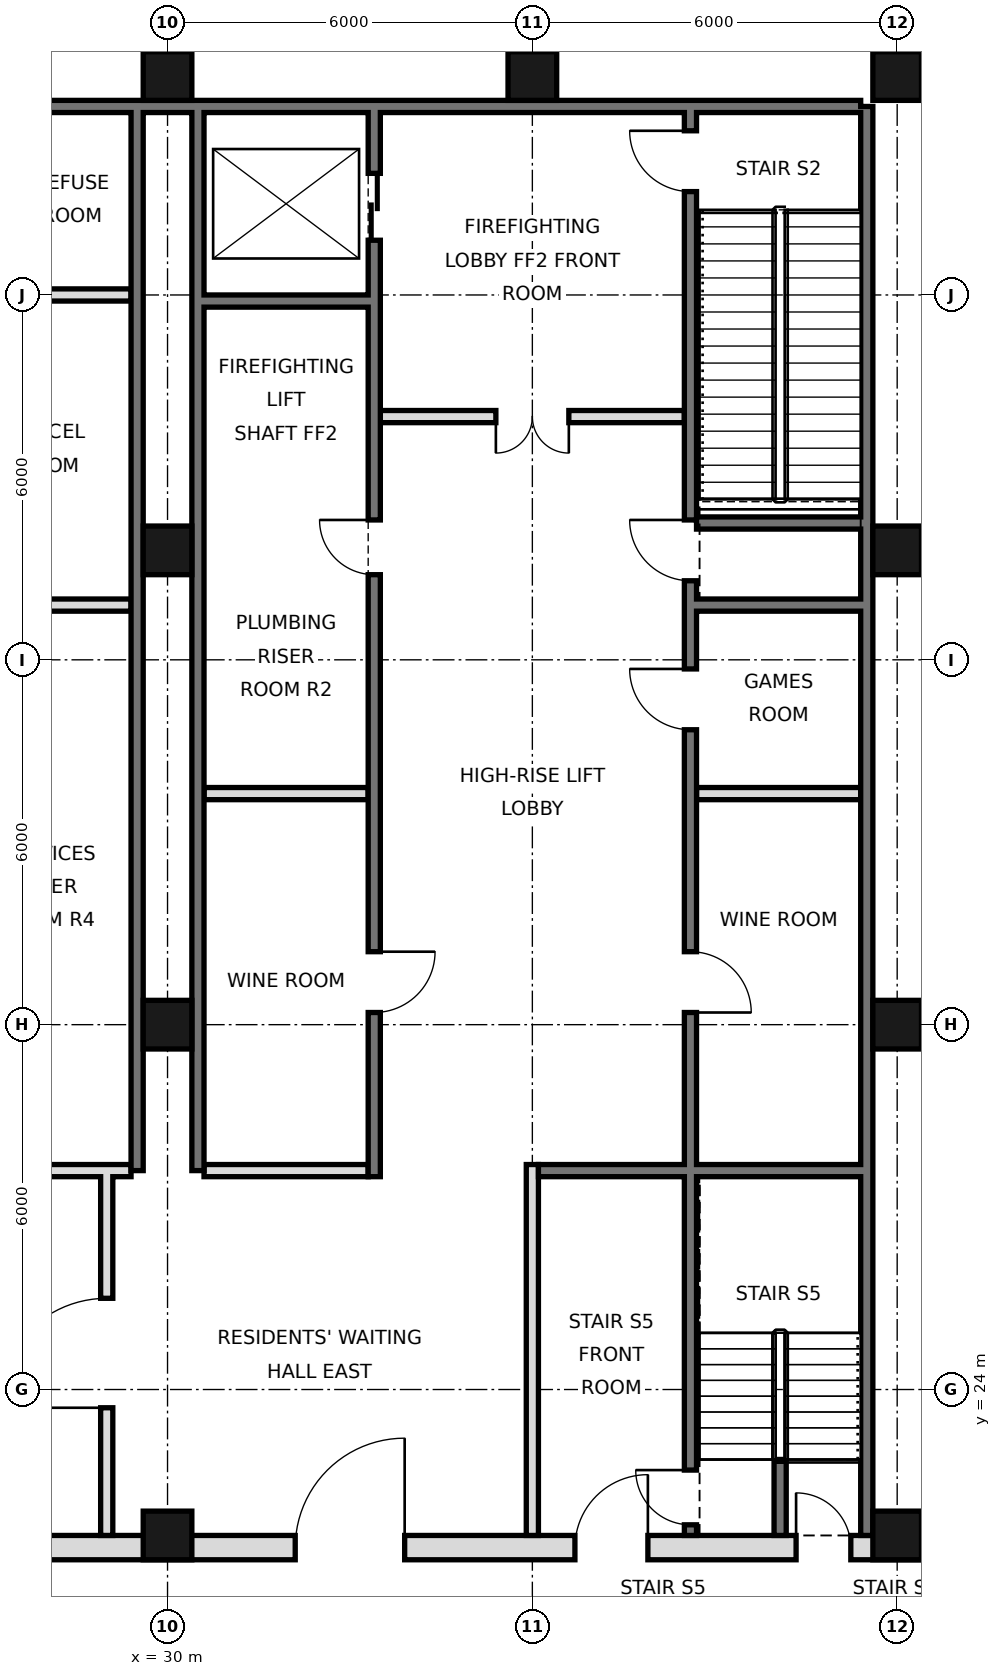
"""IFC4 building model, lengths in metres.
Left out: names, types, materials, properties, quantities, classifications, styles, units other than length and angle.
Written with IfcOpenShell. Run it as: python <this file> out.ifc"""

import sys

from ifc_helpers import new_model, si_unit, direction, frame, frame_2d, origin, origin_2d, place, context, subcontext, project, spatial, rectangle, hollow_rectangle, extrude, element, fill, save


model = new_model("IFC4")
c1 = context("Model", 3, precision=1e-05, world=origin(), true_north=direction((0.0, 1.0)))
c2 = subcontext(c1, "Body", "Model", "MODEL_VIEW")
j1 = project(units=[si_unit("LENGTHUNIT", "METRE"), si_unit("PLANEANGLEUNIT", "RADIAN")], contexts=[c1])
p1 = place(None, origin())
s1 = spatial("IfcSite", under=j1, at=p1, CompositionType="ELEMENT")
p2 = place(p1, origin())
s2 = spatial("IfcBuilding", under=s1, at=p2, CompositionType="ELEMENT")
p3 = place(p2, frame((0.0, 0.0, 90.2)))
s3 = spatial("IfcBuildingStorey", under=s2, at=p3, CompositionType="ELEMENT", Elevation=90.2)
for number, where, z_axis, x_axis in (
    (1, (30.0, 21.6, 0.0), (0.0, 0.0, 1.0), (1.0, 0.0, 0.0)),
    (2, (30.0, 30.0, 0.0), (0.0, 0.0, 1.0), (1.0, 0.0, 0.0)),
    (3, (30.0, 37.8, 0.0), (0.0, 0.0, 1.0), (1.0, 0.0, 0.0)),
    (4, (30.0, 45.6, 0.0), (0.0, 0.0, 1.0), (1.0, 0.0, 0.0)),
    (5, (36.0, 45.6, 0.0), (0.0, 0.0, 1.0), (1.0, 0.0, 0.0)),
    (6, (42.0, 21.6, 0.0), (0.0, 0.0, 1.0), (1.0, 0.0, 0.0)),
    (7, (42.0, 30.0, 0.0), (0.0, 0.0, 1.0), (1.0, 0.0, 0.0)),
    (8, (42.0, 37.8, 0.0), (0.0, 0.0, 1.0), (1.0, 0.0, 0.0)),
    (9, (42.0, 45.6, 0.0), (0.0, 0.0, 1.0), (1.0, 0.0, 0.0)),
):
    element("IfcColumn", number, at=place(p3, frame(where, z_axis=z_axis, x_axis=x_axis)), inside=s3, PredefinedType="COLUMN", context=c2, shape_type="SweptSolid", body=[
        extrude(hollow_rectangle(XDim=0.8, YDim=0.8, WallThickness=0.06, at=origin_2d()), origin(), (0.0, 0.0, 1.0), 6.0),
    ])
p4 = place(p3, frame((41.5, 21.6, 0.0), z_axis=(0.0, 0.0, 1.0), x_axis=(0.0, 1.0, 0.0)))
e10 = element("IfcWall", 10, at=p4, inside=s3, PredefinedType="SOLIDWALL", context=c2, shape_type="SweptSolid", body=[
    extrude(rectangle(XDim=23.5, YDim=0.2, at=frame_2d((11.75, 0.0))), origin(), (0.0, 0.0, 1.0), 5.7),
])
p5 = place(p3, frame((6.6, 45.1, 0.0), z_axis=(0.0, 0.0, 1.0), x_axis=(1.0, 0.0, 0.0)))
e11 = element("IfcWall", 11, at=p5, inside=s3, PredefinedType="SOLIDWALL", context=c2, shape_type="SweptSolid", body=[
    extrude(rectangle(XDim=34.8, YDim=0.2, at=frame_2d((17.4, 0.0))), origin(), (0.0, 0.0, 1.0), 5.7),
])
for number, where, z_axis, x_axis in (
    (12, (29.5, 27.6, 0.0), (0.0, 0.0, 1.0), (0.0, 1.0, 0.0)),
    (13, (30.5, 27.6, 0.0), (0.0, 0.0, 1.0), (0.0, 1.0, 0.0)),
):
    element("IfcWall", number, at=place(p3, frame(where, z_axis=z_axis, x_axis=x_axis)), inside=s3, PredefinedType="SOLIDWALL", context=c2, shape_type="SweptSolid", body=[
        extrude(rectangle(XDim=17.5, YDim=0.2, at=frame_2d((8.75, 0.0))), origin(), (0.0, 0.0, 1.0), 5.7),
    ])
p6 = place(p3, frame((5.6, 21.4, 0.0), z_axis=(0.0, 0.0, 1.0), x_axis=(1.0, 0.0, 0.0)))
e14 = element("IfcWall", 14, at=p6, inside=s3, PredefinedType="SOLIDWALL", context=c2, shape_type="SweptSolid", body=[
    extrude(rectangle(XDim=36.8, YDim=0.4, at=frame_2d((18.4, 0.0))), origin(), (0.0, 0.0, 1.0), 5.7),
])
p7 = place(p6, frame((8.5, 0.0, 0.0)))
e15 = element("IfcOpeningElement", 15, at=p7, cuts=e14, PredefinedType="OPENING", context=c2, shape_type="SweptSolid", body=[
    extrude(rectangle(XDim=1.8, YDim=2.1, at=frame_2d((0.9, 1.05))), frame((0.0, 0.21, 0.0), z_axis=(0.0, -1.0, 0.0), x_axis=(1.0, 0.0, 0.0)), (0.0, 0.0, 1.0), 0.42),
])
p8 = place(p6, frame((17.5, 0.0, 0.0)))
e16 = element("IfcOpeningElement", 16, at=p8, cuts=e14, PredefinedType="OPENING", context=c2, shape_type="SweptSolid", body=[
    extrude(rectangle(XDim=1.8, YDim=2.1, at=frame_2d((0.9, 1.05))), frame((0.0, 0.21, 0.0), z_axis=(0.0, -1.0, 0.0), x_axis=(1.0, 0.0, 0.0)), (0.0, 0.0, 1.0), 0.42),
])
p9 = place(p6, frame((26.5, 0.0, 0.0)))
e17 = element("IfcOpeningElement", 17, at=p9, cuts=e14, PredefinedType="OPENING", context=c2, shape_type="SweptSolid", body=[
    extrude(rectangle(XDim=1.8, YDim=2.1, at=frame_2d((0.9, 1.05))), frame((0.0, 0.21, 0.0), z_axis=(0.0, -1.0, 0.0), x_axis=(1.0, 0.0, 0.0)), (0.0, 0.0, 1.0), 0.42),
])
p10 = place(p6, frame((4.5, 0.0, 0.0)))
e18 = element("IfcOpeningElement", 18, at=p10, cuts=e14, PredefinedType="OPENING", context=c2, shape_type="SweptSolid", body=[
    extrude(rectangle(XDim=1.2, YDim=2.1, at=frame_2d((0.6, 1.05))), frame((0.0, 0.21, 0.0), z_axis=(0.0, -1.0, 0.0), x_axis=(1.0, 0.0, 0.0)), (0.0, 0.0, 1.0), 0.42),
])
p11 = place(p6, frame((31.1, 0.0, 0.0)))
e19 = element("IfcOpeningElement", 19, at=p11, cuts=e14, PredefinedType="OPENING", context=c2, shape_type="SweptSolid", body=[
    extrude(rectangle(XDim=1.2, YDim=2.1, at=frame_2d((0.6, 1.05))), frame((0.0, 0.21, 0.0), z_axis=(0.0, -1.0, 0.0), x_axis=(1.0, 0.0, 0.0)), (0.0, 0.0, 1.0), 0.42),
])
p12 = place(p6, frame((1.163, 0.0, 0.0)))
e20 = element("IfcOpeningElement", 20, at=p12, cuts=e14, PredefinedType="OPENING", context=c2, shape_type="SweptSolid", body=[
    extrude(rectangle(XDim=0.9, YDim=2.1, at=frame_2d((0.45, 1.05))), frame((0.0, 0.21, 0.0), z_axis=(0.0, -1.0, 0.0), x_axis=(1.0, 0.0, 0.0)), (0.0, 0.0, 1.0), 0.42),
])
p13 = place(p6, frame((34.738, 0.0, 0.0)))
e21 = element("IfcOpeningElement", 21, at=p13, cuts=e14, PredefinedType="OPENING", context=c2, shape_type="SweptSolid", body=[
    extrude(rectangle(XDim=0.9, YDim=2.1, at=frame_2d((0.45, 1.05))), frame((0.0, 0.21, 0.0), z_axis=(0.0, -1.0, 0.0), x_axis=(1.0, 0.0, 0.0)), (0.0, 0.0, 1.0), 0.42),
])
p14 = place(p3, frame((29.0, 21.6, 0.0), z_axis=(0.0, 0.0, 1.0), x_axis=(0.0, 1.0, 0.0)))
e22 = element("IfcWall", 22, at=p14, inside=s3, PredefinedType="PARTITIONING", context=c2, shape_type="SweptSolid", body=[
    extrude(rectangle(XDim=6.0, YDim=0.2, at=frame_2d((3.0, 0.0))), origin(), (0.0, 0.0, 1.0), 5.7),
])
p15 = place(p14, frame((2.1, 0.0, 0.0)))
e23 = element("IfcOpeningElement", 23, at=p15, cuts=e22, PredefinedType="OPENING", context=c2, shape_type="SweptSolid", body=[
    extrude(rectangle(XDim=1.8, YDim=2.1, at=frame_2d((0.9, 1.05))), frame((0.0, 0.11, 0.0), z_axis=(0.0, -1.0, 0.0), x_axis=(1.0, 0.0, 0.0)), (0.0, 0.0, 1.0), 0.22),
])
p16 = place(p3, frame((33.4, 27.5, 0.0), z_axis=(0.0, 0.0, 1.0), x_axis=(0.0, 1.0, 0.0)))
e24 = element("IfcWall", 24, at=p16, inside=s3, PredefinedType="SOLIDWALL", context=c2, shape_type="SweptSolid", body=[
    extrude(rectangle(XDim=17.5, YDim=0.2, at=frame_2d((8.75, 0.0))), origin(), (0.0, 0.0, 1.0), 5.7),
])
p17 = place(p16, frame((15.4, 0.0, 0.0)))
e25 = element("IfcOpeningElement", 25, at=p17, cuts=e24, PredefinedType="OPENING", context=c2, shape_type="SweptSolid", body=[
    extrude(rectangle(XDim=1.1, YDim=2.1, at=frame_2d((0.55, 1.05))), frame((0.0, 0.11, 0.0), z_axis=(0.0, -1.0, 0.0), x_axis=(1.0, 0.0, 0.0)), (0.0, 0.0, 1.0), 0.22),
])
p18 = place(p16, frame((2.7, 0.0, 0.0)))
e26 = element("IfcOpeningElement", 26, at=p18, cuts=e24, PredefinedType="OPENING", context=c2, shape_type="SweptSolid", body=[
    extrude(rectangle(XDim=1.0, YDim=2.1, at=frame_2d((0.5, 1.05))), frame((0.0, 0.11, 0.0), z_axis=(0.0, -1.0, 0.0), x_axis=(1.0, 0.0, 0.0)), (0.0, 0.0, 1.0), 0.22),
])
p19 = place(p16, frame((9.9, 0.0, 0.0)))
e27 = element("IfcOpeningElement", 27, at=p19, cuts=e24, PredefinedType="OPENING", context=c2, shape_type="SweptSolid", body=[
    extrude(rectangle(XDim=0.9, YDim=2.1, at=frame_2d((0.45, 1.05))), frame((0.0, 0.11, 0.0), z_axis=(0.0, -1.0, 0.0), x_axis=(1.0, 0.0, 0.0)), (0.0, 0.0, 1.0), 0.22),
])
p20 = place(p3, frame((36.0, 21.6, 0.0), z_axis=(0.0, 0.0, 1.0), x_axis=(0.0, 1.0, 0.0)))
e28 = element("IfcWall", 28, at=p20, inside=s3, PredefinedType="PARTITIONING", context=c2, shape_type="SweptSolid", body=[
    extrude(rectangle(XDim=6.1, YDim=0.2, at=frame_2d((3.05, 0.0))), origin(), (0.0, 0.0, 1.0), 5.7),
])
p21 = place(p3, frame((38.6, 21.6, 0.0), z_axis=(0.0, 0.0, 1.0), x_axis=(0.0, 1.0, 0.0)))
e29 = element("IfcWall", 29, at=p21, inside=s3, PredefinedType="SOLIDWALL", context=c2, shape_type="SweptSolid", body=[
    extrude(rectangle(XDim=23.4, YDim=0.2, at=frame_2d((11.7, 0.0))), origin(), (0.0, 0.0, 1.0), 5.7),
])
p22 = place(p21, frame((8.6, 0.0, 0.0)))
e30 = element("IfcOpeningElement", 30, at=p22, cuts=e29, PredefinedType="OPENING", context=c2, shape_type="SweptSolid", body=[
    extrude(rectangle(XDim=1.0, YDim=2.1, at=frame_2d((0.5, 1.05))), frame((0.0, 0.11, 0.0), z_axis=(0.0, -1.0, 0.0), x_axis=(1.0, 0.0, 0.0)), (0.0, 0.0, 1.0), 0.22),
])
p23 = place(p21, frame((13.25, 0.0, 0.0)))
e31 = element("IfcOpeningElement", 31, at=p23, cuts=e29, PredefinedType="OPENING", context=c2, shape_type="SweptSolid", body=[
    extrude(rectangle(XDim=1.0, YDim=2.1, at=frame_2d((0.5, 1.05))), frame((0.0, 0.11, 0.0), z_axis=(0.0, -1.0, 0.0), x_axis=(1.0, 0.0, 0.0)), (0.0, 0.0, 1.0), 0.22),
])
p24 = place(p21, frame((15.7, 0.0, 0.0)))
e32 = element("IfcOpeningElement", 32, at=p24, cuts=e29, PredefinedType="OPENING", context=c2, shape_type="SweptSolid", body=[
    extrude(rectangle(XDim=1.0, YDim=2.1, at=frame_2d((0.5, 1.05))), frame((0.0, 0.11, 0.0), z_axis=(0.0, -1.0, 0.0), x_axis=(1.0, 0.0, 0.0)), (0.0, 0.0, 1.0), 0.22),
])
p25 = place(p21, frame((22.1, 0.0, 0.0)))
e33 = element("IfcOpeningElement", 33, at=p25, cuts=e29, PredefinedType="OPENING", context=c2, shape_type="SweptSolid", body=[
    extrude(rectangle(XDim=1.0, YDim=2.1, at=frame_2d((0.5, 1.05))), frame((0.0, 0.11, 0.0), z_axis=(0.0, -1.0, 0.0), x_axis=(1.0, 0.0, 0.0)), (0.0, 0.0, 1.0), 0.22),
])
p26 = place(p21, frame((0.175, 0.0, 0.0)))
e34 = element("IfcOpeningElement", 34, at=p26, cuts=e29, PredefinedType="OPENING", context=c2, shape_type="SweptSolid", body=[
    extrude(rectangle(XDim=0.9, YDim=2.1, at=frame_2d((0.45, 1.05))), frame((0.0, 0.11, 0.0), z_axis=(0.0, -1.0, 0.0), x_axis=(1.0, 0.0, 0.0)), (0.0, 0.0, 1.0), 0.22),
])
p27 = place(p3, frame((40.075, 21.6, 0.0), z_axis=(0.0, 0.0, 1.0), x_axis=(0.0, 1.0, 0.0)))
e35 = element("IfcWall", 35, at=p27, inside=s3, PredefinedType="SOLIDWALL", context=c2, shape_type="SweptSolid", body=[
    extrude(rectangle(XDim=1.25, YDim=0.2, at=frame_2d((0.625, 0.0))), origin(), (0.0, 0.0, 1.0), 5.7),
])
p28 = place(p3, frame((26.7, 27.6, 0.0), z_axis=(0.0, 0.0, 1.0), x_axis=(1.0, 0.0, 0.0)))
e36 = element("IfcWall", 36, at=p28, inside=s3, PredefinedType="SOLIDWALL", context=c2, shape_type="SweptSolid", body=[
    extrude(rectangle(XDim=2.7, YDim=0.2, at=frame_2d((1.35, 0.0))), origin(), (0.0, 0.0, 1.0), 5.7),
])
p29 = place(p3, frame((30.6, 27.6, 0.0), z_axis=(0.0, 0.0, 1.0), x_axis=(1.0, 0.0, 0.0)))
e37 = element("IfcWall", 37, at=p29, inside=s3, PredefinedType="PARTITIONING", context=c2, shape_type="SweptSolid", body=[
    extrude(rectangle(XDim=2.7, YDim=0.2, at=frame_2d((1.35, 0.0))), origin(), (0.0, 0.0, 1.0), 5.7),
])
p30 = place(p3, frame((36.1, 27.6, 0.0), z_axis=(0.0, 0.0, 1.0), x_axis=(1.0, 0.0, 0.0)))
e38 = element("IfcWall", 38, at=p30, inside=s3, PredefinedType="SOLIDWALL", context=c2, shape_type="SweptSolid", body=[
    extrude(rectangle(XDim=5.3, YDim=0.2, at=frame_2d((2.65, 0.0))), origin(), (0.0, 0.0, 1.0), 5.7),
])
p31 = place(p3, frame((30.6, 33.8, 0.0), z_axis=(0.0, 0.0, 1.0), x_axis=(1.0, 0.0, 0.0)))
e39 = element("IfcWall", 39, at=p31, inside=s3, PredefinedType="SOLIDWALL", context=c2, shape_type="SweptSolid", body=[
    extrude(rectangle(XDim=2.7, YDim=0.2, at=frame_2d((1.35, 0.0))), origin(), (0.0, 0.0, 1.0), 5.7),
])
p32 = place(p3, frame((38.7, 33.8, 0.0), z_axis=(0.0, 0.0, 1.0), x_axis=(1.0, 0.0, 0.0)))
e40 = element("IfcWall", 40, at=p32, inside=s3, PredefinedType="PARTITIONING", context=c2, shape_type="SweptSolid", body=[
    extrude(rectangle(XDim=2.7, YDim=0.2, at=frame_2d((1.35, 0.0))), origin(), (0.0, 0.0, 1.0), 5.7),
])
for number, where, z_axis, x_axis in (
    (41, (26.7, 36.9, 0.0), (0.0, 0.0, 1.0), (1.0, 0.0, 0.0)),
    (42, (38.7, 36.9, 0.0), (0.0, 0.0, 1.0), (1.0, 0.0, 0.0)),
):
    element("IfcWall", number, at=place(p3, frame(where, z_axis=z_axis, x_axis=x_axis)), inside=s3, PredefinedType="SOLIDWALL", context=c2, shape_type="SweptSolid", body=[
        extrude(rectangle(XDim=2.7, YDim=0.2, at=frame_2d((1.35, 0.0))), origin(), (0.0, 0.0, 1.0), 5.7),
    ])
p33 = place(p3, frame((38.7, 38.25, 0.0), z_axis=(0.0, 0.0, 1.0), x_axis=(1.0, 0.0, 0.0)))
e43 = element("IfcWall", 43, at=p33, inside=s3, PredefinedType="SOLIDWALL", context=c2, shape_type="SweptSolid", body=[
    extrude(rectangle(XDim=2.7, YDim=0.2, at=frame_2d((1.35, 0.0))), origin(), (0.0, 0.0, 1.0), 2.8),
])
p34 = place(p3, frame((33.5, 40.0, 0.0), z_axis=(0.0, 0.0, 1.0), x_axis=(1.0, 0.0, 0.0)))
e44 = element("IfcWall", 44, at=p34, inside=s3, PredefinedType="PARTITIONING", context=c2, shape_type="SweptSolid", body=[
    extrude(rectangle(XDim=5.0, YDim=0.2, at=frame_2d((2.5, 0.0))), origin(), (0.0, 0.0, 1.0), 5.7),
])
p35 = place(p34, frame((1.9, 0.0, 0.0)))
e45 = element("IfcOpeningElement", 45, at=p35, cuts=e44, PredefinedType="OPENING", context=c2, shape_type="SweptSolid", body=[
    extrude(rectangle(XDim=1.2, YDim=2.1, at=frame_2d((0.6, 1.05))), frame((0.0, 0.11, 0.0), z_axis=(0.0, -1.0, 0.0), x_axis=(1.0, 0.0, 0.0)), (0.0, 0.0, 1.0), 0.22),
])
p36 = place(p3, frame((30.6, 41.9, 0.0), z_axis=(0.0, 0.0, 1.0), x_axis=(1.0, 0.0, 0.0)))
e46 = element("IfcWall", 46, at=p36, inside=s3, PredefinedType="SOLIDWALL", context=c2, shape_type="SweptSolid", body=[
    extrude(rectangle(XDim=2.7, YDim=0.2, at=frame_2d((1.35, 0.0))), origin(), (0.0, 0.0, 1.0), 5.7),
])
p37 = place(p3, frame((26.7, 42.0, 0.0), z_axis=(0.0, 0.0, 1.0), x_axis=(1.0, 0.0, 0.0)))
e47 = element("IfcWall", 47, at=p37, inside=s3, PredefinedType="PARTITIONING", context=c2, shape_type="SweptSolid", body=[
    extrude(rectangle(XDim=2.7, YDim=0.2, at=frame_2d((1.35, 0.0))), origin(), (0.0, 0.0, 1.0), 5.7),
])
p38 = place(p15, origin())
e48 = element("IfcDoor", 48, at=p38, inside=s3, OperationType="SINGLE_SWING_LEFT", PredefinedType="DOOR", context=c2, shape_type="SweptSolid", body=[
    extrude(rectangle(XDim=1.8, YDim=2.1, at=frame_2d((0.9, 1.05))), frame((0.0, 0.025, 0.0), z_axis=(0.0, -1.0, 0.0), x_axis=(1.0, 0.0, 0.0)), (0.0, 0.0, 1.0), 0.05),
])
fill(e23, e48)
p39 = place(p9, frame((1.8, 0.0, 0.0), z_axis=(0.0, 0.0, 1.0), x_axis=(-1.0, 0.0, 0.0)))
e49 = element("IfcDoor", 49, at=p39, inside=s3, OperationType="SINGLE_SWING_LEFT", PredefinedType="DOOR", context=c2, shape_type="SweptSolid", body=[
    extrude(rectangle(XDim=1.8, YDim=2.1, at=frame_2d((0.9, 1.05))), frame((0.0, 0.025, 0.0), z_axis=(0.0, -1.0, 0.0), x_axis=(1.0, 0.0, 0.0)), (0.0, 0.0, 1.0), 0.05),
])
fill(e17, e49)
p40 = place(p11, frame((1.2, 0.0, 0.0), z_axis=(0.0, 0.0, 1.0), x_axis=(-1.0, 0.0, 0.0)))
e50 = element("IfcDoor", 50, at=p40, inside=s3, OperationType="SINGLE_SWING_LEFT", PredefinedType="DOOR", context=c2, shape_type="SweptSolid", body=[
    extrude(rectangle(XDim=1.2, YDim=2.1, at=frame_2d((0.6, 1.05))), frame((0.0, 0.025, 0.0), z_axis=(0.0, -1.0, 0.0), x_axis=(1.0, 0.0, 0.0)), (0.0, 0.0, 1.0), 0.05),
])
fill(e19, e50)
p41 = place(p35, frame((1.2, 0.0, 0.0), z_axis=(0.0, 0.0, 1.0), x_axis=(-1.0, 0.0, 0.0)))
e51 = element("IfcDoor", 51, at=p41, inside=s3, OperationType="DOUBLE_DOOR_SINGLE_SWING", PredefinedType="DOOR", context=c2, shape_type="SweptSolid", body=[
    extrude(rectangle(XDim=1.2, YDim=2.1, at=frame_2d((0.6, 1.05))), frame((0.0, 0.025, 0.0), z_axis=(0.0, -1.0, 0.0), x_axis=(1.0, 0.0, 0.0)), (0.0, 0.0, 1.0), 0.05),
])
fill(e45, e51)
p42 = place(p17, origin())
e52 = element("IfcDoor", 52, at=p42, inside=s3, OperationType="DOUBLE_DOOR_SLIDING", PredefinedType="DOOR", context=c2, shape_type="SweptSolid", body=[
    extrude(rectangle(XDim=1.1, YDim=2.1, at=frame_2d((0.55, 1.05))), frame((0.0, 0.025, 0.0), z_axis=(0.0, -1.0, 0.0), x_axis=(1.0, 0.0, 0.0)), (0.0, 0.0, 1.0), 0.05),
])
fill(e25, e52)
p43 = place(p22, frame((1.0, 0.0, 0.0), z_axis=(0.0, 0.0, 1.0), x_axis=(-1.0, 0.0, 0.0)))
e53 = element("IfcDoor", 53, at=p43, inside=s3, OperationType="SINGLE_SWING_RIGHT", PredefinedType="DOOR", context=c2, shape_type="SweptSolid", body=[
    extrude(rectangle(XDim=1.0, YDim=2.1, at=frame_2d((0.5, 1.05))), frame((0.0, 0.025, 0.0), z_axis=(0.0, -1.0, 0.0), x_axis=(1.0, 0.0, 0.0)), (0.0, 0.0, 1.0), 0.05),
])
fill(e30, e53)
p44 = place(p23, frame((1.0, 0.0, 0.0), z_axis=(0.0, 0.0, 1.0), x_axis=(-1.0, 0.0, 0.0)))
e54 = element("IfcDoor", 54, at=p44, inside=s3, OperationType="SINGLE_SWING_LEFT", PredefinedType="DOOR", context=c2, shape_type="SweptSolid", body=[
    extrude(rectangle(XDim=1.0, YDim=2.1, at=frame_2d((0.5, 1.05))), frame((0.0, 0.025, 0.0), z_axis=(0.0, -1.0, 0.0), x_axis=(1.0, 0.0, 0.0)), (0.0, 0.0, 1.0), 0.05),
])
fill(e31, e54)
p45 = place(p18, origin())
e55 = element("IfcDoor", 55, at=p45, inside=s3, OperationType="SINGLE_SWING_RIGHT", PredefinedType="DOOR", context=c2, shape_type="SweptSolid", body=[
    extrude(rectangle(XDim=1.0, YDim=2.1, at=frame_2d((0.5, 1.05))), frame((0.0, 0.025, 0.0), z_axis=(0.0, -1.0, 0.0), x_axis=(1.0, 0.0, 0.0)), (0.0, 0.0, 1.0), 0.05),
])
fill(e26, e55)
p46 = place(p24, frame((1.0, 0.0, 0.0), z_axis=(0.0, 0.0, 1.0), x_axis=(-1.0, 0.0, 0.0)))
e56 = element("IfcDoor", 56, at=p46, inside=s3, OperationType="SINGLE_SWING_LEFT", PredefinedType="DOOR", context=c2, shape_type="SweptSolid", body=[
    extrude(rectangle(XDim=1.0, YDim=2.1, at=frame_2d((0.5, 1.05))), frame((0.0, 0.025, 0.0), z_axis=(0.0, -1.0, 0.0), x_axis=(1.0, 0.0, 0.0)), (0.0, 0.0, 1.0), 0.05),
])
fill(e32, e56)
p47 = place(p25, frame((1.0, 0.0, 0.0), z_axis=(0.0, 0.0, 1.0), x_axis=(-1.0, 0.0, 0.0)))
e57 = element("IfcDoor", 57, at=p47, inside=s3, OperationType="SINGLE_SWING_LEFT", PredefinedType="DOOR", context=c2, shape_type="SweptSolid", body=[
    extrude(rectangle(XDim=1.0, YDim=2.1, at=frame_2d((0.5, 1.05))), frame((0.0, 0.025, 0.0), z_axis=(0.0, -1.0, 0.0), x_axis=(1.0, 0.0, 0.0)), (0.0, 0.0, 1.0), 0.05),
])
fill(e33, e57)
p48 = place(p26, frame((0.9, 0.0, 0.0), z_axis=(0.0, 0.0, 1.0), x_axis=(-1.0, 0.0, 0.0)))
e58 = element("IfcDoor", 58, at=p48, inside=s3, OperationType="SINGLE_SWING_LEFT", PredefinedType="DOOR", context=c2, shape_type="SweptSolid", body=[
    extrude(rectangle(XDim=0.9, YDim=2.1, at=frame_2d((0.45, 1.05))), frame((0.0, 0.025, 0.0), z_axis=(0.0, -1.0, 0.0), x_axis=(1.0, 0.0, 0.0)), (0.0, 0.0, 1.0), 0.05),
])
fill(e34, e58)
p49 = place(p13, origin())
e59 = element("IfcDoor", 59, at=p49, inside=s3, OperationType="SINGLE_SWING_LEFT", PredefinedType="DOOR", context=c2, shape_type="SweptSolid", body=[
    extrude(rectangle(XDim=0.9, YDim=2.1, at=frame_2d((0.45, 1.05))), frame((0.0, 0.025, 0.0), z_axis=(0.0, -1.0, 0.0), x_axis=(1.0, 0.0, 0.0)), (0.0, 0.0, 1.0), 0.05),
])
fill(e21, e59)
p50 = place(p19, frame((0.9, 0.0, 0.0), z_axis=(0.0, 0.0, 1.0), x_axis=(-1.0, 0.0, 0.0)))
e60 = element("IfcDoor", 60, at=p50, inside=s3, OperationType="SINGLE_SWING_LEFT", PredefinedType="DOOR", context=c2, shape_type="SweptSolid", body=[
    extrude(rectangle(XDim=0.9, YDim=2.1, at=frame_2d((0.45, 1.05))), frame((0.0, 0.025, 0.0), z_axis=(0.0, -1.0, 0.0), x_axis=(1.0, 0.0, 0.0)), (0.0, 0.0, 1.0), 0.05),
])
fill(e27, e60)
save(model, sys.argv[1])
